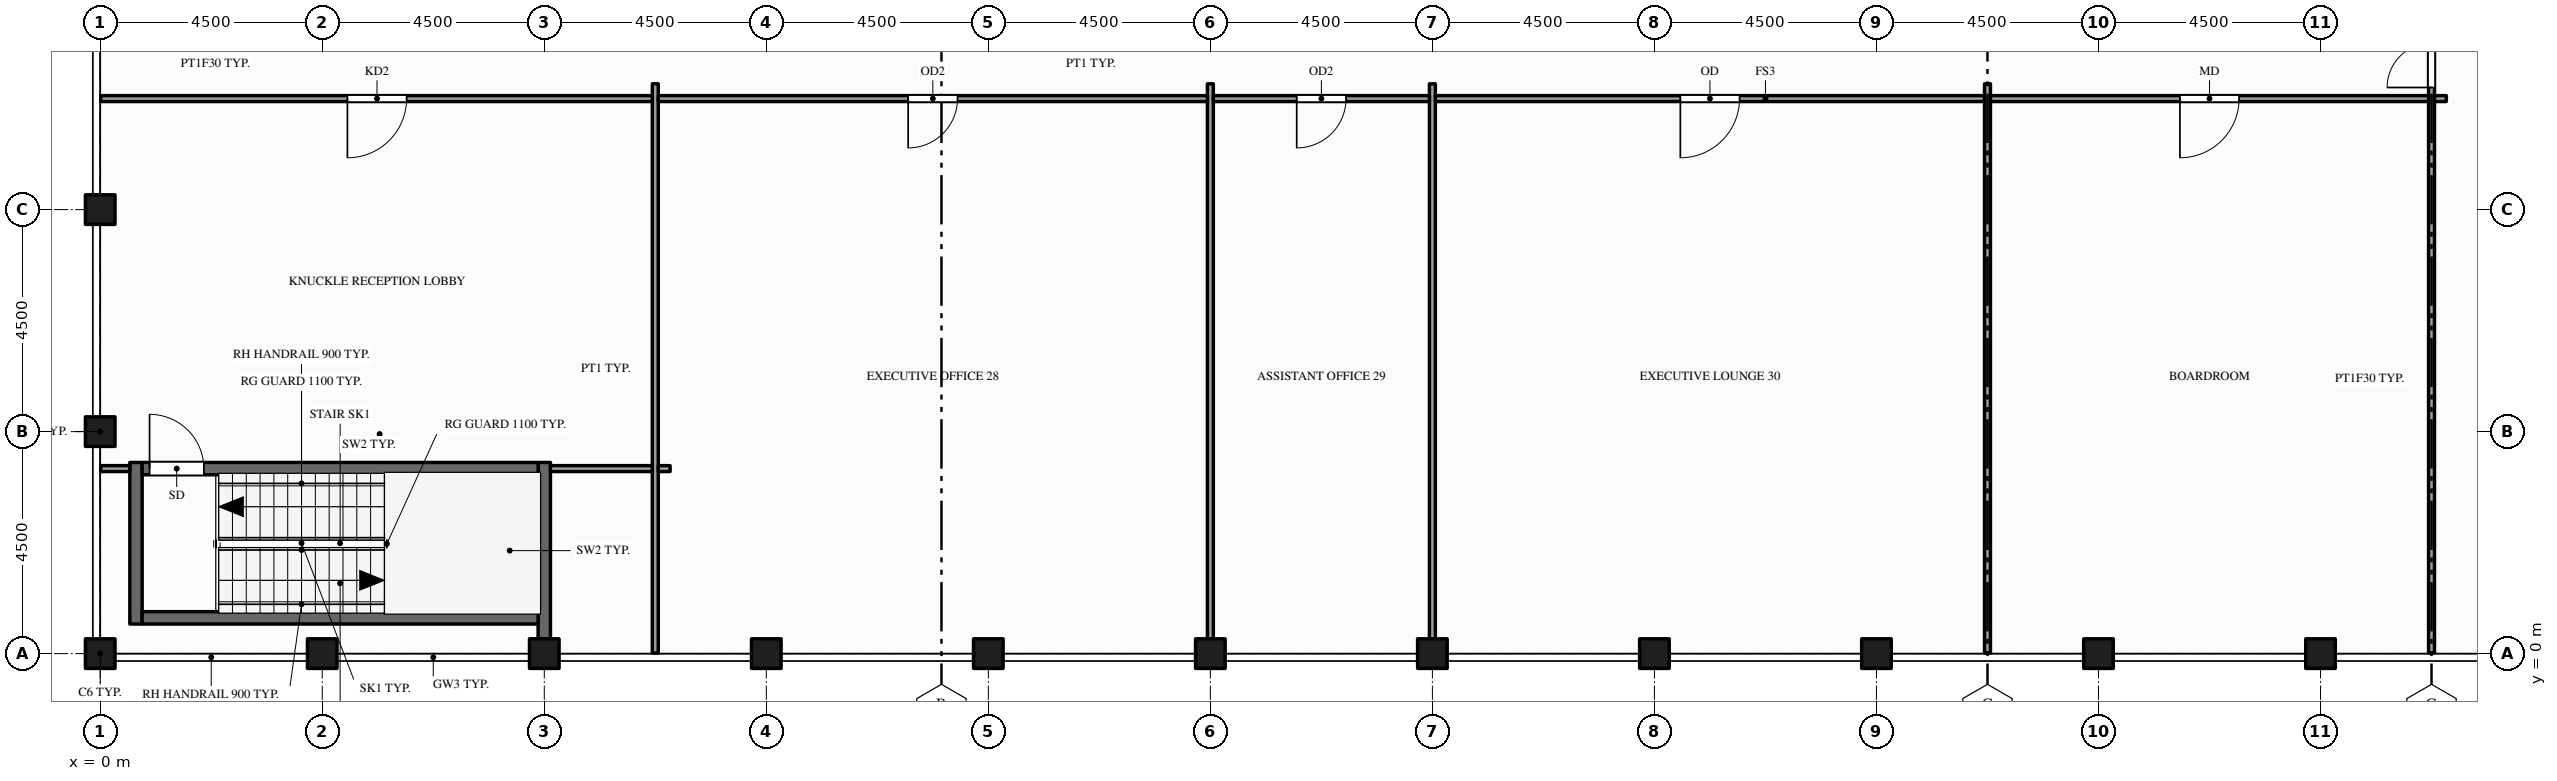
"""IFC4 building model, lengths in metres.
Left out: names, types, materials, properties, quantities, classifications, styles, units other than length and angle.
Written with IfcOpenShell. Run it as: python <this file> out.ifc"""

import sys

from ifc_helpers import new_model, si_unit, direction, frame, frame_2d, origin, origin_2d, place, context, subcontext, project, spatial, rectangle, hollow_rectangle, extrude, element, fill, save


model = new_model("IFC4")
c1 = context("Model", 3, precision=1e-05, world=origin(), true_north=direction((0.0, 1.0)))
c2 = subcontext(c1, "Body", "Model", "MODEL_VIEW")
j1 = project(units=[si_unit("LENGTHUNIT", "METRE"), si_unit("PLANEANGLEUNIT", "RADIAN")], contexts=[c1])
p1 = place(None, origin())
s1 = spatial("IfcSite", under=j1, at=p1, CompositionType="ELEMENT")
p2 = place(p1, origin())
s2 = spatial("IfcBuilding", under=s1, at=p2, CompositionType="ELEMENT")
p3 = place(p2, frame((0.0, 0.0, 318.5)))
s3 = spatial("IfcBuildingStorey", under=s2, at=p3, CompositionType="ELEMENT", Elevation=318.5)
for number, where, z_axis, x_axis in (
    (1, (0.0, 0.0, -0.15), (0.0, 0.0, 1.0), (1.0, 0.0, 0.0)),
    (2, (0.0, 4.5, -0.15), (0.0, 0.0, 1.0), (1.0, 0.0, 0.0)),
    (3, (0.0, 9.0, -0.15), (0.0, 0.0, 1.0), (1.0, 0.0, 0.0)),
    (4, (4.5, 0.0, -0.15), (0.0, 0.0, 1.0), (1.0, 0.0, 0.0)),
    (5, (9.0, 0.0, -0.15), (0.0, 0.0, 1.0), (1.0, 0.0, 0.0)),
    (6, (13.5, 0.0, -0.15), (0.0, 0.0, 1.0), (1.0, 0.0, 0.0)),
    (7, (18.0, 0.0, -0.15), (0.0, 0.0, 1.0), (1.0, 0.0, 0.0)),
    (8, (22.5, 0.0, -0.15), (0.0, 0.0, 1.0), (1.0, 0.0, 0.0)),
    (9, (27.0, 0.0, -0.15), (0.0, 0.0, 1.0), (1.0, 0.0, 0.0)),
    (10, (31.5, 0.0, -0.15), (0.0, 0.0, 1.0), (1.0, 0.0, 0.0)),
    (11, (36.0, 0.0, -0.15), (0.0, 0.0, 1.0), (1.0, 0.0, 0.0)),
    (12, (40.5, 0.0, -0.15), (0.0, 0.0, 1.0), (1.0, 0.0, 0.0)),
    (13, (45.0, 0.0, -0.15), (0.0, 0.0, 1.0), (1.0, 0.0, 0.0)),
):
    element("IfcColumn", number, at=place(p3, frame(where, z_axis=z_axis, x_axis=x_axis)), inside=s3, PredefinedType="COLUMN", context=c2, shape_type="SweptSolid", body=[
        extrude(hollow_rectangle(XDim=0.6, YDim=0.6, WallThickness=0.03, at=origin_2d()), origin(), (0.0, 0.0, 1.0), 4.5),
    ])
p4 = place(p3, frame((0.725, 0.6, 0.0), z_axis=(0.0, 0.0, 1.0), x_axis=(0.0, 1.0, 0.0)))
e14 = element("IfcWall", 14, at=p4, inside=s3, PredefinedType="SHEAR", context=c2, shape_type="SweptSolid", body=[
    extrude(rectangle(XDim=3.275, YDim=0.25, at=frame_2d((1.637, 0.0))), origin(), (0.0, 0.0, 1.0), 4.35),
])
p5 = place(p3, frame((9.0, 0.3, 0.0), z_axis=(0.0, 0.0, 1.0), x_axis=(0.0, 1.0, 0.0)))
e15 = element("IfcWall", 15, at=p5, inside=s3, PredefinedType="SHEAR", context=c2, shape_type="SweptSolid", body=[
    extrude(rectangle(XDim=3.575, YDim=0.25, at=frame_2d((1.788, 0.0))), origin(), (0.0, 0.0, 1.0), 4.35),
])
for number, where, z_axis, x_axis in (
    (16, (11.25, 0.01, 0.0), (0.0, 0.0, 1.0), (0.0, 1.0, 0.0)),
    (17, (22.5, 0.01, 0.0), (0.0, 0.0, 1.0), (0.0, 1.0, 0.0)),
    (18, (27.0, 0.01, 0.0), (0.0, 0.0, 1.0), (0.0, 1.0, 0.0)),
    (19, (38.25, 0.01, 0.0), (0.0, 0.0, 1.0), (0.0, 1.0, 0.0)),
):
    element("IfcWall", number, at=place(p3, frame(where, z_axis=z_axis, x_axis=x_axis)), inside=s3, PredefinedType="PARTITIONING", context=c2, shape_type="SweptSolid", body=[
        extrude(rectangle(XDim=11.54, YDim=0.12, at=frame_2d((5.77, 0.0))), origin(), (0.0, 0.0, 1.0), 3.359),
    ])
p6 = place(p3, frame((47.25, 0.01, 0.0), z_axis=(0.0, 0.0, 1.0), x_axis=(0.0, 1.0, 0.0)))
e20 = element("IfcWall", 20, at=p6, inside=s3, PredefinedType="PARTITIONING", context=c2, shape_type="SweptSolid", body=[
    extrude(rectangle(XDim=22.48, YDim=0.12, at=frame_2d((11.24, 0.0))), origin(), (0.0, 0.0, 1.0), 3.359),
])
p7 = place(p6, frame((11.465, 0.0, 0.0)))
e21 = element("IfcOpeningElement", 21, at=p7, cuts=e20, PredefinedType="OPENING", context=c2, shape_type="SweptSolid", body=[
    extrude(rectangle(XDim=1.8, YDim=2.1, at=frame_2d((0.9, 1.05))), frame((0.0, 0.07, 0.0), z_axis=(0.0, -1.0, 0.0), x_axis=(1.0, 0.0, 0.0)), (0.0, 0.0, 1.0), 0.14),
])
p8 = place(p6, frame((14.49, 0.0, 0.0)))
e22 = element("IfcOpeningElement", 22, at=p8, cuts=e20, PredefinedType="OPENING", context=c2, shape_type="SweptSolid", body=[
    extrude(rectangle(XDim=0.9, YDim=2.1, at=frame_2d((0.45, 1.05))), frame((0.0, 0.07, 0.0), z_axis=(0.0, -1.0, 0.0), x_axis=(1.0, 0.0, 0.0)), (0.0, 0.0, 1.0), 0.14),
])
p9 = place(p6, frame((17.54, 0.0, 0.0)))
e23 = element("IfcOpeningElement", 23, at=p9, cuts=e20, PredefinedType="OPENING", context=c2, shape_type="SweptSolid", body=[
    extrude(rectangle(XDim=0.9, YDim=2.1, at=frame_2d((0.45, 1.05))), frame((0.0, 0.07, 0.0), z_axis=(0.0, -1.0, 0.0), x_axis=(1.0, 0.0, 0.0)), (0.0, 0.0, 1.0), 0.14),
])
p10 = place(p6, frame((20.49, 0.0, 0.0)))
e24 = element("IfcOpeningElement", 24, at=p10, cuts=e20, PredefinedType="OPENING", context=c2, shape_type="SweptSolid", body=[
    extrude(rectangle(XDim=1.0, YDim=2.1, at=frame_2d((0.5, 1.05))), frame((0.0, 0.07, 0.0), z_axis=(0.0, -1.0, 0.0), x_axis=(1.0, 0.0, 0.0)), (0.0, 0.0, 1.0), 0.14),
])
p11 = place(p3, frame((0.85, 0.725, 0.0), z_axis=(0.0, 0.0, 1.0), x_axis=(1.0, 0.0, 0.0)))
e25 = element("IfcWall", 25, at=p11, inside=s3, PredefinedType="SHEAR", context=c2, shape_type="SweptSolid", body=[
    extrude(rectangle(XDim=8.025, YDim=0.25, at=frame_2d((4.012, 0.0))), origin(), (0.0, 0.0, 1.0), 4.35),
])
p12 = place(p3, frame((0.01, 3.75, 0.0), z_axis=(0.0, 0.0, 1.0), x_axis=(1.0, 0.0, 0.0)))
e26 = element("IfcWall", 26, at=p12, inside=s3, PredefinedType="PARTITIONING", context=c2, shape_type="SweptSolid", body=[
    extrude(rectangle(XDim=0.59, YDim=0.12, at=frame_2d((0.295, 0.0))), origin(), (0.0, 0.0, 1.0), 3.672),
])
p13 = place(p3, frame((0.85, 3.75, 0.0), z_axis=(0.0, 0.0, 1.0), x_axis=(1.0, 0.0, 0.0)))
e27 = element("IfcWall", 27, at=p13, inside=s3, PredefinedType="SHEAR", context=c2, shape_type="SweptSolid", body=[
    extrude(rectangle(XDim=8.025, YDim=0.25, at=frame_2d((4.012, 0.0))), origin(), (0.0, 0.0, 1.0), 4.35),
])
p14 = place(p13, frame((0.15, 0.0, 0.0)))
e28 = element("IfcOpeningElement", 28, at=p14, cuts=e27, PredefinedType="OPENING", context=c2, shape_type="SweptSolid", body=[
    extrude(rectangle(XDim=1.1, YDim=2.1, at=frame_2d((0.55, 1.05))), frame((0.0, 0.135, 0.0), z_axis=(0.0, -1.0, 0.0), x_axis=(1.0, 0.0, 0.0)), (0.0, 0.0, 1.0), 0.27),
])
p15 = place(p3, frame((9.125, 3.75, 0.0), z_axis=(0.0, 0.0, 1.0), x_axis=(1.0, 0.0, 0.0)))
e29 = element("IfcWall", 29, at=p15, inside=s3, PredefinedType="PARTITIONING", context=c2, shape_type="SweptSolid", body=[
    extrude(rectangle(XDim=2.065, YDim=0.12, at=frame_2d((1.032, 0.0))), origin(), (0.0, 0.0, 1.0), 3.359),
])
p16 = place(p3, frame((11.31, 3.75, 0.0), z_axis=(0.0, 0.0, 1.0), x_axis=(1.0, 0.0, 0.0)))
e30 = element("IfcWall", 30, at=p16, inside=s3, PredefinedType="PARTITIONING", context=c2, shape_type="SweptSolid", body=[
    extrude(rectangle(XDim=0.24, YDim=0.12, at=frame_2d((0.12, 0.0))), origin(), (0.0, 0.0, 1.0), 3.359),
])
p17 = place(p3, frame((0.01, 11.25, 0.0), z_axis=(0.0, 0.0, 1.0), x_axis=(1.0, 0.0, 0.0)))
e31 = element("IfcWall", 31, at=p17, inside=s3, PredefinedType="PARTITIONING", context=c2, shape_type="SweptSolid", body=[
    extrude(rectangle(XDim=11.18, YDim=0.12, at=frame_2d((5.59, 0.0))), origin(), (0.0, 0.0, 1.0), 3.359),
])
p18 = place(p17, frame((5.0, 0.0, 0.0)))
e32 = element("IfcOpeningElement", 32, at=p18, cuts=e31, PredefinedType="OPENING", context=c2, shape_type="SweptSolid", body=[
    extrude(rectangle(XDim=1.2, YDim=2.1, at=frame_2d((0.6, 1.05))), frame((0.0, 0.07, 0.0), z_axis=(0.0, -1.0, 0.0), x_axis=(1.0, 0.0, 0.0)), (0.0, 0.0, 1.0), 0.14),
])
p19 = place(p3, frame((11.31, 11.25, 0.0), z_axis=(0.0, 0.0, 1.0), x_axis=(1.0, 0.0, 0.0)))
e33 = element("IfcWall", 33, at=p19, inside=s3, PredefinedType="PARTITIONING", context=c2, shape_type="SweptSolid", body=[
    extrude(rectangle(XDim=11.13, YDim=0.12, at=frame_2d((5.565, 0.0))), origin(), (0.0, 0.0, 1.0), 3.359),
])
p20 = place(p19, frame((5.065, 0.0, 0.0)))
e34 = element("IfcOpeningElement", 34, at=p20, cuts=e33, PredefinedType="OPENING", context=c2, shape_type="SweptSolid", body=[
    extrude(rectangle(XDim=1.0, YDim=2.1, at=frame_2d((0.5, 1.05))), frame((0.0, 0.07, 0.0), z_axis=(0.0, -1.0, 0.0), x_axis=(1.0, 0.0, 0.0)), (0.0, 0.0, 1.0), 0.14),
])
p21 = place(p3, frame((22.56, 11.25, 0.0), z_axis=(0.0, 0.0, 1.0), x_axis=(1.0, 0.0, 0.0)))
e35 = element("IfcWall", 35, at=p21, inside=s3, PredefinedType="PARTITIONING", context=c2, shape_type="SweptSolid", body=[
    extrude(rectangle(XDim=4.38, YDim=0.12, at=frame_2d((2.19, 0.0))), origin(), (0.0, 0.0, 1.0), 3.359),
])
p22 = place(p21, frame((1.69, 0.0, 0.0)))
e36 = element("IfcOpeningElement", 36, at=p22, cuts=e35, PredefinedType="OPENING", context=c2, shape_type="SweptSolid", body=[
    extrude(rectangle(XDim=1.0, YDim=2.1, at=frame_2d((0.5, 1.05))), frame((0.0, 0.07, 0.0), z_axis=(0.0, -1.0, 0.0), x_axis=(1.0, 0.0, 0.0)), (0.0, 0.0, 1.0), 0.14),
])
p23 = place(p3, frame((27.06, 11.25, 0.0), z_axis=(0.0, 0.0, 1.0), x_axis=(1.0, 0.0, 0.0)))
e37 = element("IfcWall", 37, at=p23, inside=s3, PredefinedType="PARTITIONING", context=c2, shape_type="SweptSolid", body=[
    extrude(rectangle(XDim=11.13, YDim=0.12, at=frame_2d((5.565, 0.0))), origin(), (0.0, 0.0, 1.0), 3.359),
])
p24 = place(p23, frame((4.965, 0.0, 0.0)))
e38 = element("IfcOpeningElement", 38, at=p24, cuts=e37, PredefinedType="OPENING", context=c2, shape_type="SweptSolid", body=[
    extrude(rectangle(XDim=1.2, YDim=2.1, at=frame_2d((0.6, 1.05))), frame((0.0, 0.07, 0.0), z_axis=(0.0, -1.0, 0.0), x_axis=(1.0, 0.0, 0.0)), (0.0, 0.0, 1.0), 0.14),
])
p25 = place(p3, frame((38.31, 11.25, 0.0), z_axis=(0.0, 0.0, 1.0), x_axis=(1.0, 0.0, 0.0)))
e39 = element("IfcWall", 39, at=p25, inside=s3, PredefinedType="PARTITIONING", context=c2, shape_type="SweptSolid", body=[
    extrude(rectangle(XDim=8.88, YDim=0.12, at=frame_2d((4.44, 0.0))), origin(), (0.0, 0.0, 1.0), 3.359),
])
p26 = place(p25, frame((3.84, 0.0, 0.0)))
e40 = element("IfcOpeningElement", 40, at=p26, cuts=e39, PredefinedType="OPENING", context=c2, shape_type="SweptSolid", body=[
    extrude(rectangle(XDim=1.2, YDim=2.1, at=frame_2d((0.6, 1.05))), frame((0.0, 0.07, 0.0), z_axis=(0.0, -1.0, 0.0), x_axis=(1.0, 0.0, 0.0)), (0.0, 0.0, 1.0), 0.14),
])
p27 = place(p3, frame((47.31, 11.25, 0.0), z_axis=(0.0, 0.0, 1.0), x_axis=(1.0, 0.0, 0.0)))
e41 = element("IfcWall", 41, at=p27, inside=s3, PredefinedType="PARTITIONING", context=c2, shape_type="SweptSolid", body=[
    extrude(rectangle(XDim=0.24, YDim=0.12, at=frame_2d((0.12, 0.0))), origin(), (0.0, 0.0, 1.0), 3.359),
])
p28 = place(p7, origin())
e42 = element("IfcDoor", 42, at=p28, inside=s3, OperationType="DOUBLE_DOOR_SINGLE_SWING", PredefinedType="DOOR", context=c2, shape_type="SweptSolid", body=[
    extrude(rectangle(XDim=1.8, YDim=2.1, at=frame_2d((0.9, 1.05))), frame((0.0, 0.025, 0.0), z_axis=(0.0, -1.0, 0.0), x_axis=(1.0, 0.0, 0.0)), (0.0, 0.0, 1.0), 0.05),
])
fill(e21, e42)
p29 = place(p14, origin())
e43 = element("IfcDoor", 43, at=p29, inside=s3, OperationType="SINGLE_SWING_LEFT", PredefinedType="DOOR", context=c2, shape_type="SweptSolid", body=[
    extrude(rectangle(XDim=1.1, YDim=2.1, at=frame_2d((0.55, 1.05))), frame((0.0, 0.025, 0.0), z_axis=(0.0, -1.0, 0.0), x_axis=(1.0, 0.0, 0.0)), (0.0, 0.0, 1.0), 0.05),
])
fill(e28, e43)
p30 = place(p18, origin())
e44 = element("IfcDoor", 44, at=p30, inside=s3, OperationType="SINGLE_SWING_LEFT", PredefinedType="DOOR", context=c2, shape_type="SweptSolid", body=[
    extrude(rectangle(XDim=1.2, YDim=2.1, at=frame_2d((0.6, 1.05))), frame((0.0, 0.025, 0.0), z_axis=(0.0, -1.0, 0.0), x_axis=(1.0, 0.0, 0.0)), (0.0, 0.0, 1.0), 0.05),
])
fill(e32, e44)
p31 = place(p20, origin())
e45 = element("IfcDoor", 45, at=p31, inside=s3, OperationType="SINGLE_SWING_LEFT", PredefinedType="DOOR", context=c2, shape_type="SweptSolid", body=[
    extrude(rectangle(XDim=1.0, YDim=2.1, at=frame_2d((0.5, 1.05))), frame((0.0, 0.025, 0.0), z_axis=(0.0, -1.0, 0.0), x_axis=(1.0, 0.0, 0.0)), (0.0, 0.0, 1.0), 0.05),
])
fill(e34, e45)
p32 = place(p22, origin())
e46 = element("IfcDoor", 46, at=p32, inside=s3, OperationType="SINGLE_SWING_LEFT", PredefinedType="DOOR", context=c2, shape_type="SweptSolid", body=[
    extrude(rectangle(XDim=1.0, YDim=2.1, at=frame_2d((0.5, 1.05))), frame((0.0, 0.025, 0.0), z_axis=(0.0, -1.0, 0.0), x_axis=(1.0, 0.0, 0.0)), (0.0, 0.0, 1.0), 0.05),
])
fill(e36, e46)
p33 = place(p24, origin())
e47 = element("IfcDoor", 47, at=p33, inside=s3, OperationType="SINGLE_SWING_LEFT", PredefinedType="DOOR", context=c2, shape_type="SweptSolid", body=[
    extrude(rectangle(XDim=1.2, YDim=2.1, at=frame_2d((0.6, 1.05))), frame((0.0, 0.025, 0.0), z_axis=(0.0, -1.0, 0.0), x_axis=(1.0, 0.0, 0.0)), (0.0, 0.0, 1.0), 0.05),
])
fill(e38, e47)
p34 = place(p26, origin())
e48 = element("IfcDoor", 48, at=p34, inside=s3, OperationType="SINGLE_SWING_LEFT", PredefinedType="DOOR", context=c2, shape_type="SweptSolid", body=[
    extrude(rectangle(XDim=1.2, YDim=2.1, at=frame_2d((0.6, 1.05))), frame((0.0, 0.025, 0.0), z_axis=(0.0, -1.0, 0.0), x_axis=(1.0, 0.0, 0.0)), (0.0, 0.0, 1.0), 0.05),
])
fill(e40, e48)
save(model, sys.argv[1])
